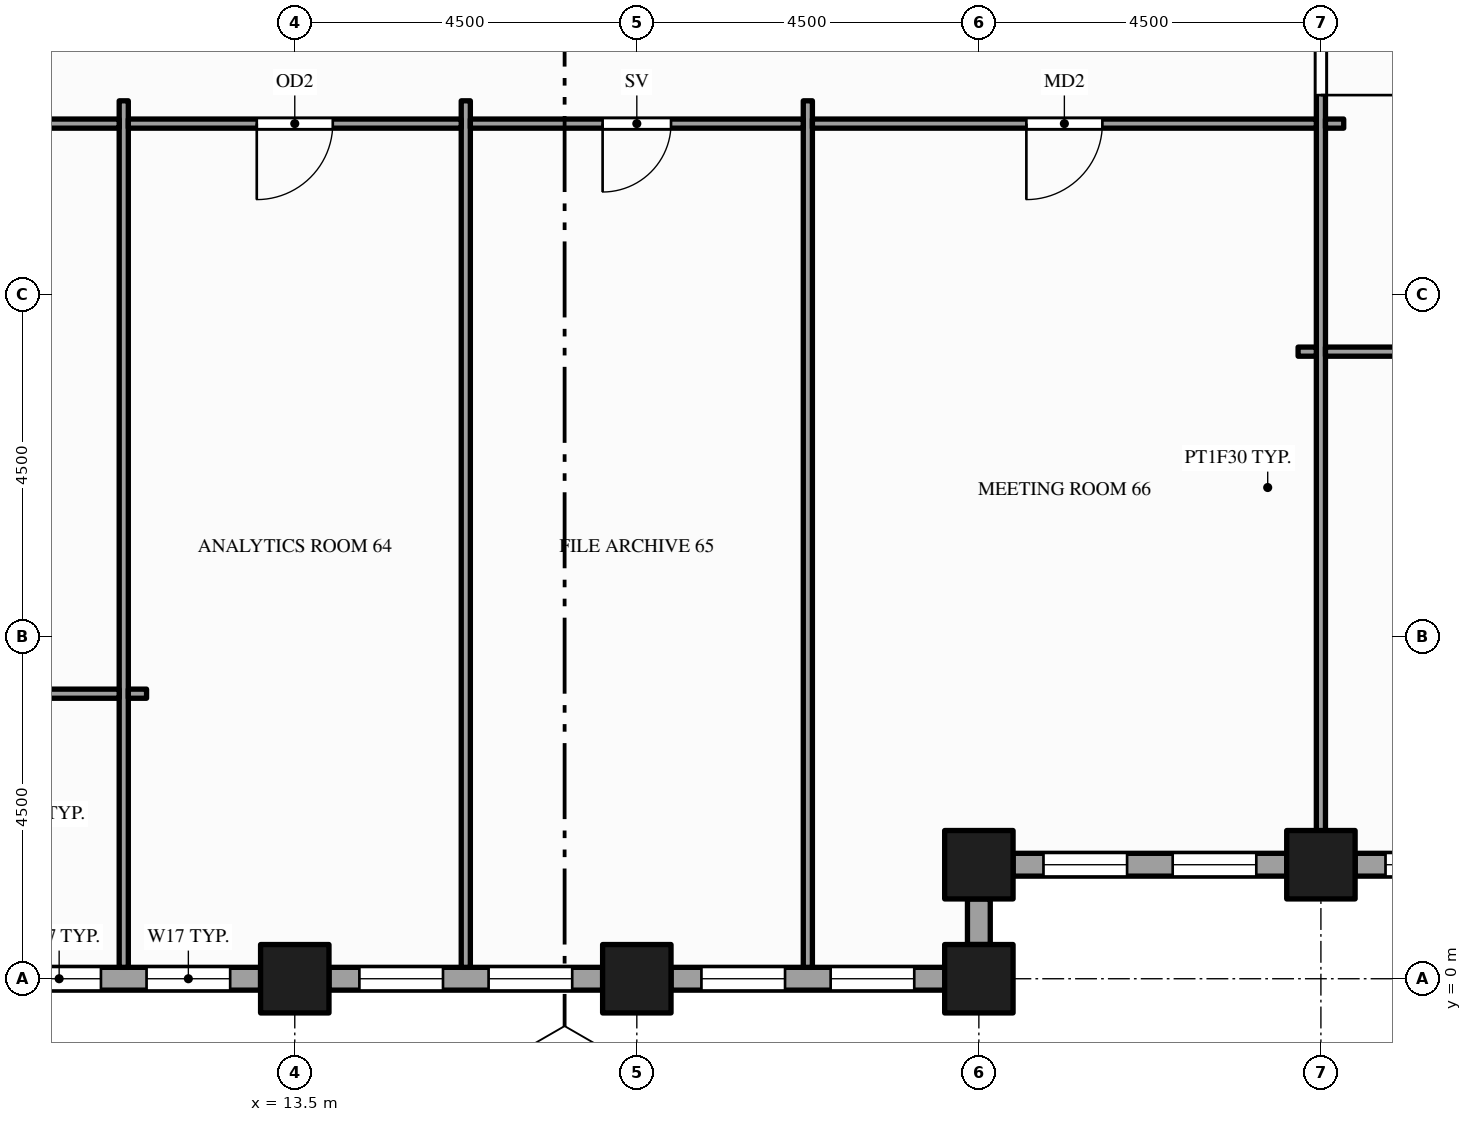
"""IFC4 building model, lengths in metres.
Left out: names, types, materials, properties, quantities, classifications, styles, units other than length and angle.
Written with IfcOpenShell. Run it as: python <this file> out.ifc"""

import sys

from ifc_helpers import new_model, si_unit, direction, frame, frame_2d, origin, origin_2d, place, context, subcontext, project, spatial, rectangle, hollow_rectangle, extrude, element, fill, save


model = new_model("IFC4")
c1 = context("Model", 3, precision=1e-05, world=origin(), true_north=direction((0.0, 1.0)))
c2 = subcontext(c1, "Body", "Model", "MODEL_VIEW")
j1 = project(units=[si_unit("LENGTHUNIT", "METRE"), si_unit("PLANEANGLEUNIT", "RADIAN")], contexts=[c1])
p1 = place(None, origin())
s1 = spatial("IfcSite", under=j1, at=p1, CompositionType="ELEMENT")
p2 = place(p1, origin())
s2 = spatial("IfcBuilding", under=s1, at=p2, CompositionType="ELEMENT")
p3 = place(p2, frame((0.0, 0.0, 171.0)))
s3 = spatial("IfcBuildingStorey", under=s2, at=p3, CompositionType="ELEMENT", Elevation=171.0)
for number, where, z_axis, x_axis in (
    (1, (13.5, 0.0, -0.15), (0.0, 0.0, 1.0), (1.0, 0.0, 0.0)),
    (2, (18.0, 0.0, -0.15), (0.0, 0.0, 1.0), (1.0, 0.0, 0.0)),
    (3, (22.5, 0.0, -0.15), (0.0, 0.0, 1.0), (1.0, 0.0, 0.0)),
    (4, (22.5, 1.5, -0.15), (0.0, 0.0, 1.0), (1.0, 0.0, 0.0)),
    (5, (27.0, 1.5, -0.15), (0.0, 0.0, 1.0), (1.0, 0.0, 0.0)),
):
    element("IfcColumn", number, at=place(p3, frame(where, z_axis=z_axis, x_axis=x_axis)), inside=s3, PredefinedType="COLUMN", context=c2, shape_type="SweptSolid", body=[
        extrude(hollow_rectangle(XDim=0.9, YDim=0.9, WallThickness=0.045, at=origin_2d()), origin(), (0.0, 0.0, 1.0), 4.0),
    ])
p4 = place(p3, frame((9.45, 0.0, 0.0), z_axis=(0.0, 0.0, 1.0), x_axis=(1.0, 0.0, 0.0)))
e6 = element("IfcWall", 6, at=p4, inside=s3, PredefinedType="STANDARD", context=c2, shape_type="SweptSolid", body=[
    extrude(rectangle(XDim=3.6, YDim=0.3, at=frame_2d((1.8, 0.0))), origin(), (0.0, 0.0, 1.0), 2.87),
])
p5 = place(p4, frame((0.4, 0.0, 0.9)))
e7 = element("IfcOpeningElement", 7, at=p5, cuts=e6, PredefinedType="OPENING", context=c2, shape_type="SweptSolid", body=[
    extrude(rectangle(XDim=1.1, YDim=1.75, at=frame_2d((0.55, 0.875))), frame((0.0, 0.16, 0.0), z_axis=(0.0, -1.0, 0.0), x_axis=(1.0, 0.0, 0.0)), (0.0, 0.0, 1.0), 0.32),
])
p6 = place(p4, frame((2.1, 0.0, 0.9)))
e8 = element("IfcOpeningElement", 8, at=p6, cuts=e6, PredefinedType="OPENING", context=c2, shape_type="SweptSolid", body=[
    extrude(rectangle(XDim=1.1, YDim=1.75, at=frame_2d((0.55, 0.875))), frame((0.0, 0.16, 0.0), z_axis=(0.0, -1.0, 0.0), x_axis=(1.0, 0.0, 0.0)), (0.0, 0.0, 1.0), 0.32),
])
p7 = place(p3, frame((13.95, 0.0, 0.0), z_axis=(0.0, 0.0, 1.0), x_axis=(1.0, 0.0, 0.0)))
e9 = element("IfcWall", 9, at=p7, inside=s3, PredefinedType="STANDARD", context=c2, shape_type="SweptSolid", body=[
    extrude(rectangle(XDim=3.6, YDim=0.3, at=frame_2d((1.8, 0.0))), origin(), (0.0, 0.0, 1.0), 2.87),
])
p8 = place(p7, frame((0.4, 0.0, 0.9)))
e10 = element("IfcOpeningElement", 10, at=p8, cuts=e9, PredefinedType="OPENING", context=c2, shape_type="SweptSolid", body=[
    extrude(rectangle(XDim=1.1, YDim=1.75, at=frame_2d((0.55, 0.875))), frame((0.0, 0.16, 0.0), z_axis=(0.0, -1.0, 0.0), x_axis=(1.0, 0.0, 0.0)), (0.0, 0.0, 1.0), 0.32),
])
p9 = place(p7, frame((2.1, 0.0, 0.9)))
e11 = element("IfcOpeningElement", 11, at=p9, cuts=e9, PredefinedType="OPENING", context=c2, shape_type="SweptSolid", body=[
    extrude(rectangle(XDim=1.1, YDim=1.75, at=frame_2d((0.55, 0.875))), frame((0.0, 0.16, 0.0), z_axis=(0.0, -1.0, 0.0), x_axis=(1.0, 0.0, 0.0)), (0.0, 0.0, 1.0), 0.32),
])
p10 = place(p3, frame((18.45, 0.0, 0.0), z_axis=(0.0, 0.0, 1.0), x_axis=(1.0, 0.0, 0.0)))
e12 = element("IfcWall", 12, at=p10, inside=s3, PredefinedType="STANDARD", context=c2, shape_type="SweptSolid", body=[
    extrude(rectangle(XDim=3.6, YDim=0.3, at=frame_2d((1.8, 0.0))), origin(), (0.0, 0.0, 1.0), 2.87),
])
p11 = place(p10, frame((0.4, 0.0, 0.9)))
e13 = element("IfcOpeningElement", 13, at=p11, cuts=e12, PredefinedType="OPENING", context=c2, shape_type="SweptSolid", body=[
    extrude(rectangle(XDim=1.1, YDim=1.75, at=frame_2d((0.55, 0.875))), frame((0.0, 0.16, 0.0), z_axis=(0.0, -1.0, 0.0), x_axis=(1.0, 0.0, 0.0)), (0.0, 0.0, 1.0), 0.32),
])
p12 = place(p10, frame((2.1, 0.0, 0.9)))
e14 = element("IfcOpeningElement", 14, at=p12, cuts=e12, PredefinedType="OPENING", context=c2, shape_type="SweptSolid", body=[
    extrude(rectangle(XDim=1.1, YDim=1.75, at=frame_2d((0.55, 0.875))), frame((0.0, 0.16, 0.0), z_axis=(0.0, -1.0, 0.0), x_axis=(1.0, 0.0, 0.0)), (0.0, 0.0, 1.0), 0.32),
])
p13 = place(p3, frame((22.5, 0.45, 0.0), z_axis=(0.0, 0.0, 1.0), x_axis=(0.0, 1.0, 0.0)))
e15 = element("IfcWall", 15, at=p13, inside=s3, PredefinedType="STANDARD", context=c2, shape_type="SweptSolid", body=[
    extrude(rectangle(XDim=0.6, YDim=0.3, at=frame_2d((0.3, 0.0))), origin(), (0.0, 0.0, 1.0), 3.149),
])
p14 = place(p3, frame((22.95, 1.5, 0.0), z_axis=(0.0, 0.0, 1.0), x_axis=(1.0, 0.0, 0.0)))
e16 = element("IfcWall", 16, at=p14, inside=s3, PredefinedType="STANDARD", context=c2, shape_type="SweptSolid", body=[
    extrude(rectangle(XDim=3.6, YDim=0.3, at=frame_2d((1.8, 0.0))), origin(), (0.0, 0.0, 1.0), 2.87),
])
p15 = place(p14, frame((0.4, 0.0, 0.9)))
e17 = element("IfcOpeningElement", 17, at=p15, cuts=e16, PredefinedType="OPENING", context=c2, shape_type="SweptSolid", body=[
    extrude(rectangle(XDim=1.1, YDim=1.75, at=frame_2d((0.55, 0.875))), frame((0.0, 0.16, 0.0), z_axis=(0.0, -1.0, 0.0), x_axis=(1.0, 0.0, 0.0)), (0.0, 0.0, 1.0), 0.32),
])
p16 = place(p14, frame((2.1, 0.0, 0.9)))
e18 = element("IfcOpeningElement", 18, at=p16, cuts=e16, PredefinedType="OPENING", context=c2, shape_type="SweptSolid", body=[
    extrude(rectangle(XDim=1.1, YDim=1.75, at=frame_2d((0.55, 0.875))), frame((0.0, 0.16, 0.0), z_axis=(0.0, -1.0, 0.0), x_axis=(1.0, 0.0, 0.0)), (0.0, 0.0, 1.0), 0.32),
])
p17 = place(p3, frame((27.45, 1.5, 0.0), z_axis=(0.0, 0.0, 1.0), x_axis=(1.0, 0.0, 0.0)))
e19 = element("IfcWall", 19, at=p17, inside=s3, PredefinedType="STANDARD", context=c2, shape_type="SweptSolid", body=[
    extrude(rectangle(XDim=3.6, YDim=0.3, at=frame_2d((1.8, 0.0))), origin(), (0.0, 0.0, 1.0), 2.87),
])
p18 = place(p17, frame((0.4, 0.0, 0.9)))
e20 = element("IfcOpeningElement", 20, at=p18, cuts=e19, PredefinedType="OPENING", context=c2, shape_type="SweptSolid", body=[
    extrude(rectangle(XDim=1.1, YDim=1.75, at=frame_2d((0.55, 0.875))), frame((0.0, 0.16, 0.0), z_axis=(0.0, -1.0, 0.0), x_axis=(1.0, 0.0, 0.0)), (0.0, 0.0, 1.0), 0.32),
])
p19 = place(p17, frame((2.1, 0.0, 0.9)))
e21 = element("IfcOpeningElement", 21, at=p19, cuts=e19, PredefinedType="OPENING", context=c2, shape_type="SweptSolid", body=[
    extrude(rectangle(XDim=1.1, YDim=1.75, at=frame_2d((0.55, 0.875))), frame((0.0, 0.16, 0.0), z_axis=(0.0, -1.0, 0.0), x_axis=(1.0, 0.0, 0.0)), (0.0, 0.0, 1.0), 0.32),
])
for number, where, z_axis, x_axis in (
    (22, (11.25, 0.15, 0.0), (0.0, 0.0, 1.0), (0.0, 1.0, 0.0)),
    (23, (15.75, 0.15, 0.0), (0.0, 0.0, 1.0), (0.0, 1.0, 0.0)),
    (24, (20.25, 0.15, 0.0), (0.0, 0.0, 1.0), (0.0, 1.0, 0.0)),
):
    element("IfcWall", number, at=place(p3, frame(where, z_axis=z_axis, x_axis=x_axis)), inside=s3, PredefinedType="PARTITIONING", context=c2, shape_type="SweptSolid", body=[
        extrude(rectangle(XDim=11.4, YDim=0.12, at=frame_2d((5.7, 0.0))), origin(), (0.0, 0.0, 1.0), 2.87),
    ])
p20 = place(p3, frame((27.0, 1.65, 0.0), z_axis=(0.0, 0.0, 1.0), x_axis=(0.0, 1.0, 0.0)))
e25 = element("IfcWall", 25, at=p20, inside=s3, PredefinedType="PARTITIONING", context=c2, shape_type="SweptSolid", body=[
    extrude(rectangle(XDim=22.2, YDim=0.12, at=frame_2d((11.1, 0.0))), origin(), (0.0, 0.0, 1.0), 2.87),
])
p21 = place(p20, frame((9.975, 0.0, 0.0)))
e26 = element("IfcOpeningElement", 26, at=p21, cuts=e25, PredefinedType="OPENING", context=c2, shape_type="SweptSolid", body=[
    extrude(rectangle(XDim=1.5, YDim=2.1, at=frame_2d((0.75, 1.05))), frame((0.0, 0.07, 0.0), z_axis=(0.0, -1.0, 0.0), x_axis=(1.0, 0.0, 0.0)), (0.0, 0.0, 1.0), 0.14),
])
p22 = place(p20, frame((13.125, 0.0, 0.0)))
e27 = element("IfcOpeningElement", 27, at=p22, cuts=e25, PredefinedType="OPENING", context=c2, shape_type="SweptSolid", body=[
    extrude(rectangle(XDim=1.2, YDim=2.1, at=frame_2d((0.6, 1.05))), frame((0.0, 0.07, 0.0), z_axis=(0.0, -1.0, 0.0), x_axis=(1.0, 0.0, 0.0)), (0.0, 0.0, 1.0), 0.14),
])
p23 = place(p3, frame((9.125, 3.75, 0.0), z_axis=(0.0, 0.0, 1.0), x_axis=(1.0, 0.0, 0.0)))
e28 = element("IfcWall", 28, at=p23, inside=s3, PredefinedType="PARTITIONING", context=c2, shape_type="SweptSolid", body=[
    extrude(rectangle(XDim=2.065, YDim=0.12, at=frame_2d((1.032, 0.0))), origin(), (0.0, 0.0, 1.0), 2.87),
])
for number, where, z_axis, x_axis in (
    (29, (11.31, 3.75, 0.0), (0.0, 0.0, 1.0), (1.0, 0.0, 0.0)),
    (30, (26.7, 8.25, 0.0), (0.0, 0.0, 1.0), (1.0, 0.0, 0.0)),
):
    element("IfcWall", number, at=place(p3, frame(where, z_axis=z_axis, x_axis=x_axis)), inside=s3, PredefinedType="PARTITIONING", context=c2, shape_type="SweptSolid", body=[
        extrude(rectangle(XDim=0.24, YDim=0.12, at=frame_2d((0.12, 0.0))), origin(), (0.0, 0.0, 1.0), 2.87),
    ])
p24 = place(p3, frame((27.06, 8.25, 0.0), z_axis=(0.0, 0.0, 1.0), x_axis=(1.0, 0.0, 0.0)))
e31 = element("IfcWall", 31, at=p24, inside=s3, PredefinedType="PARTITIONING", context=c2, shape_type="SweptSolid", body=[
    extrude(rectangle(XDim=2.13, YDim=0.12, at=frame_2d((1.065, 0.0))), origin(), (0.0, 0.0, 1.0), 2.87),
])
p25 = place(p3, frame((0.15, 11.25, 0.0), z_axis=(0.0, 0.0, 1.0), x_axis=(1.0, 0.0, 0.0)))
e32 = element("IfcWall", 32, at=p25, inside=s3, PredefinedType="PARTITIONING", context=c2, shape_type="SweptSolid", body=[
    extrude(rectangle(XDim=11.04, YDim=0.12, at=frame_2d((5.52, 0.0))), origin(), (0.0, 0.0, 1.0), 2.87),
])
p26 = place(p25, frame((4.93, 0.0, 0.0)))
e33 = element("IfcOpeningElement", 33, at=p26, cuts=e32, PredefinedType="OPENING", context=c2, shape_type="SweptSolid", body=[
    extrude(rectangle(XDim=1.2, YDim=2.1, at=frame_2d((0.6, 1.05))), frame((0.0, 0.07, 0.0), z_axis=(0.0, -1.0, 0.0), x_axis=(1.0, 0.0, 0.0)), (0.0, 0.0, 1.0), 0.14),
])
p27 = place(p3, frame((11.31, 11.25, 0.0), z_axis=(0.0, 0.0, 1.0), x_axis=(1.0, 0.0, 0.0)))
e34 = element("IfcWall", 34, at=p27, inside=s3, PredefinedType="PARTITIONING", context=c2, shape_type="SweptSolid", body=[
    extrude(rectangle(XDim=4.38, YDim=0.12, at=frame_2d((2.19, 0.0))), origin(), (0.0, 0.0, 1.0), 2.87),
])
p28 = place(p27, frame((1.69, 0.0, 0.0)))
e35 = element("IfcOpeningElement", 35, at=p28, cuts=e34, PredefinedType="OPENING", context=c2, shape_type="SweptSolid", body=[
    extrude(rectangle(XDim=1.0, YDim=2.1, at=frame_2d((0.5, 1.05))), frame((0.0, 0.07, 0.0), z_axis=(0.0, -1.0, 0.0), x_axis=(1.0, 0.0, 0.0)), (0.0, 0.0, 1.0), 0.14),
])
p29 = place(p3, frame((15.81, 11.25, 0.0), z_axis=(0.0, 0.0, 1.0), x_axis=(1.0, 0.0, 0.0)))
e36 = element("IfcWall", 36, at=p29, inside=s3, PredefinedType="PARTITIONING", context=c2, shape_type="SweptSolid", body=[
    extrude(rectangle(XDim=4.38, YDim=0.12, at=frame_2d((2.19, 0.0))), origin(), (0.0, 0.0, 1.0), 2.87),
])
p30 = place(p29, frame((1.74, 0.0, 0.0)))
e37 = element("IfcOpeningElement", 37, at=p30, cuts=e36, PredefinedType="OPENING", context=c2, shape_type="SweptSolid", body=[
    extrude(rectangle(XDim=0.9, YDim=2.1, at=frame_2d((0.45, 1.05))), frame((0.0, 0.07, 0.0), z_axis=(0.0, -1.0, 0.0), x_axis=(1.0, 0.0, 0.0)), (0.0, 0.0, 1.0), 0.14),
])
p31 = place(p3, frame((20.31, 11.25, 0.0), z_axis=(0.0, 0.0, 1.0), x_axis=(1.0, 0.0, 0.0)))
e38 = element("IfcWall", 38, at=p31, inside=s3, PredefinedType="PARTITIONING", context=c2, shape_type="SweptSolid", body=[
    extrude(rectangle(XDim=6.63, YDim=0.12, at=frame_2d((3.315, 0.0))), origin(), (0.0, 0.0, 1.0), 2.87),
])
p32 = place(p31, frame((2.815, 0.0, 0.0)))
e39 = element("IfcOpeningElement", 39, at=p32, cuts=e38, PredefinedType="OPENING", context=c2, shape_type="SweptSolid", body=[
    extrude(rectangle(XDim=1.0, YDim=2.1, at=frame_2d((0.5, 1.05))), frame((0.0, 0.07, 0.0), z_axis=(0.0, -1.0, 0.0), x_axis=(1.0, 0.0, 0.0)), (0.0, 0.0, 1.0), 0.14),
])
p33 = place(p3, frame((27.06, 11.25, 0.0), z_axis=(0.0, 0.0, 1.0), x_axis=(1.0, 0.0, 0.0)))
e40 = element("IfcWall", 40, at=p33, inside=s3, PredefinedType="PARTITIONING", context=c2, shape_type="SweptSolid", body=[
    extrude(rectangle(XDim=0.24, YDim=0.12, at=frame_2d((0.12, 0.0))), origin(), (0.0, 0.0, 1.0), 2.87),
])
p34 = place(p5, origin())
e41 = element("IfcWindow", 41, at=p34, inside=s3, PartitioningType="SINGLE_PANEL", PredefinedType="WINDOW", context=c2, shape_type="SweptSolid", body=[
    extrude(rectangle(XDim=1.1, YDim=1.75, at=frame_2d((0.55, 0.875))), frame((0.0, 0.03, 0.0), z_axis=(0.0, -1.0, 0.0), x_axis=(1.0, 0.0, 0.0)), (0.0, 0.0, 1.0), 0.06),
])
fill(e7, e41)
p35 = place(p6, origin())
e42 = element("IfcWindow", 42, at=p35, inside=s3, PartitioningType="SINGLE_PANEL", PredefinedType="WINDOW", context=c2, shape_type="SweptSolid", body=[
    extrude(rectangle(XDim=1.1, YDim=1.75, at=frame_2d((0.55, 0.875))), frame((0.0, 0.03, 0.0), z_axis=(0.0, -1.0, 0.0), x_axis=(1.0, 0.0, 0.0)), (0.0, 0.0, 1.0), 0.06),
])
fill(e8, e42)
p36 = place(p8, origin())
e43 = element("IfcWindow", 43, at=p36, inside=s3, PartitioningType="SINGLE_PANEL", PredefinedType="WINDOW", context=c2, shape_type="SweptSolid", body=[
    extrude(rectangle(XDim=1.1, YDim=1.75, at=frame_2d((0.55, 0.875))), frame((0.0, 0.03, 0.0), z_axis=(0.0, -1.0, 0.0), x_axis=(1.0, 0.0, 0.0)), (0.0, 0.0, 1.0), 0.06),
])
fill(e10, e43)
p37 = place(p9, origin())
e44 = element("IfcWindow", 44, at=p37, inside=s3, PartitioningType="SINGLE_PANEL", PredefinedType="WINDOW", context=c2, shape_type="SweptSolid", body=[
    extrude(rectangle(XDim=1.1, YDim=1.75, at=frame_2d((0.55, 0.875))), frame((0.0, 0.03, 0.0), z_axis=(0.0, -1.0, 0.0), x_axis=(1.0, 0.0, 0.0)), (0.0, 0.0, 1.0), 0.06),
])
fill(e11, e44)
p38 = place(p11, origin())
e45 = element("IfcWindow", 45, at=p38, inside=s3, PartitioningType="SINGLE_PANEL", PredefinedType="WINDOW", context=c2, shape_type="SweptSolid", body=[
    extrude(rectangle(XDim=1.1, YDim=1.75, at=frame_2d((0.55, 0.875))), frame((0.0, 0.03, 0.0), z_axis=(0.0, -1.0, 0.0), x_axis=(1.0, 0.0, 0.0)), (0.0, 0.0, 1.0), 0.06),
])
fill(e13, e45)
p39 = place(p12, origin())
e46 = element("IfcWindow", 46, at=p39, inside=s3, PartitioningType="SINGLE_PANEL", PredefinedType="WINDOW", context=c2, shape_type="SweptSolid", body=[
    extrude(rectangle(XDim=1.1, YDim=1.75, at=frame_2d((0.55, 0.875))), frame((0.0, 0.03, 0.0), z_axis=(0.0, -1.0, 0.0), x_axis=(1.0, 0.0, 0.0)), (0.0, 0.0, 1.0), 0.06),
])
fill(e14, e46)
p40 = place(p15, origin())
e47 = element("IfcWindow", 47, at=p40, inside=s3, PartitioningType="SINGLE_PANEL", PredefinedType="WINDOW", context=c2, shape_type="SweptSolid", body=[
    extrude(rectangle(XDim=1.1, YDim=1.75, at=frame_2d((0.55, 0.875))), frame((0.0, 0.03, 0.0), z_axis=(0.0, -1.0, 0.0), x_axis=(1.0, 0.0, 0.0)), (0.0, 0.0, 1.0), 0.06),
])
fill(e17, e47)
p41 = place(p16, origin())
e48 = element("IfcWindow", 48, at=p41, inside=s3, PartitioningType="SINGLE_PANEL", PredefinedType="WINDOW", context=c2, shape_type="SweptSolid", body=[
    extrude(rectangle(XDim=1.1, YDim=1.75, at=frame_2d((0.55, 0.875))), frame((0.0, 0.03, 0.0), z_axis=(0.0, -1.0, 0.0), x_axis=(1.0, 0.0, 0.0)), (0.0, 0.0, 1.0), 0.06),
])
fill(e18, e48)
p42 = place(p18, origin())
e49 = element("IfcWindow", 49, at=p42, inside=s3, PartitioningType="SINGLE_PANEL", PredefinedType="WINDOW", context=c2, shape_type="SweptSolid", body=[
    extrude(rectangle(XDim=1.1, YDim=1.75, at=frame_2d((0.55, 0.875))), frame((0.0, 0.03, 0.0), z_axis=(0.0, -1.0, 0.0), x_axis=(1.0, 0.0, 0.0)), (0.0, 0.0, 1.0), 0.06),
])
fill(e20, e49)
p43 = place(p21, origin())
e50 = element("IfcDoor", 50, at=p43, inside=s3, OperationType="SINGLE_SWING_LEFT", PredefinedType="DOOR", context=c2, shape_type="SweptSolid", body=[
    extrude(rectangle(XDim=1.5, YDim=2.1, at=frame_2d((0.75, 1.05))), frame((0.0, 0.025, 0.0), z_axis=(0.0, -1.0, 0.0), x_axis=(1.0, 0.0, 0.0)), (0.0, 0.0, 1.0), 0.05),
])
fill(e26, e50)
p44 = place(p28, origin())
e51 = element("IfcDoor", 51, at=p44, inside=s3, OperationType="SINGLE_SWING_LEFT", PredefinedType="DOOR", context=c2, shape_type="SweptSolid", body=[
    extrude(rectangle(XDim=1.0, YDim=2.1, at=frame_2d((0.5, 1.05))), frame((0.0, 0.025, 0.0), z_axis=(0.0, -1.0, 0.0), x_axis=(1.0, 0.0, 0.0)), (0.0, 0.0, 1.0), 0.05),
])
fill(e35, e51)
p45 = place(p30, origin())
e52 = element("IfcDoor", 52, at=p45, inside=s3, OperationType="SINGLE_SWING_LEFT", PredefinedType="DOOR", context=c2, shape_type="SweptSolid", body=[
    extrude(rectangle(XDim=0.9, YDim=2.1, at=frame_2d((0.45, 1.05))), frame((0.0, 0.025, 0.0), z_axis=(0.0, -1.0, 0.0), x_axis=(1.0, 0.0, 0.0)), (0.0, 0.0, 1.0), 0.05),
])
fill(e37, e52)
p46 = place(p32, origin())
e53 = element("IfcDoor", 53, at=p46, inside=s3, OperationType="SINGLE_SWING_LEFT", PredefinedType="DOOR", context=c2, shape_type="SweptSolid", body=[
    extrude(rectangle(XDim=1.0, YDim=2.1, at=frame_2d((0.5, 1.05))), frame((0.0, 0.025, 0.0), z_axis=(0.0, -1.0, 0.0), x_axis=(1.0, 0.0, 0.0)), (0.0, 0.0, 1.0), 0.05),
])
fill(e39, e53)
save(model, sys.argv[1])
